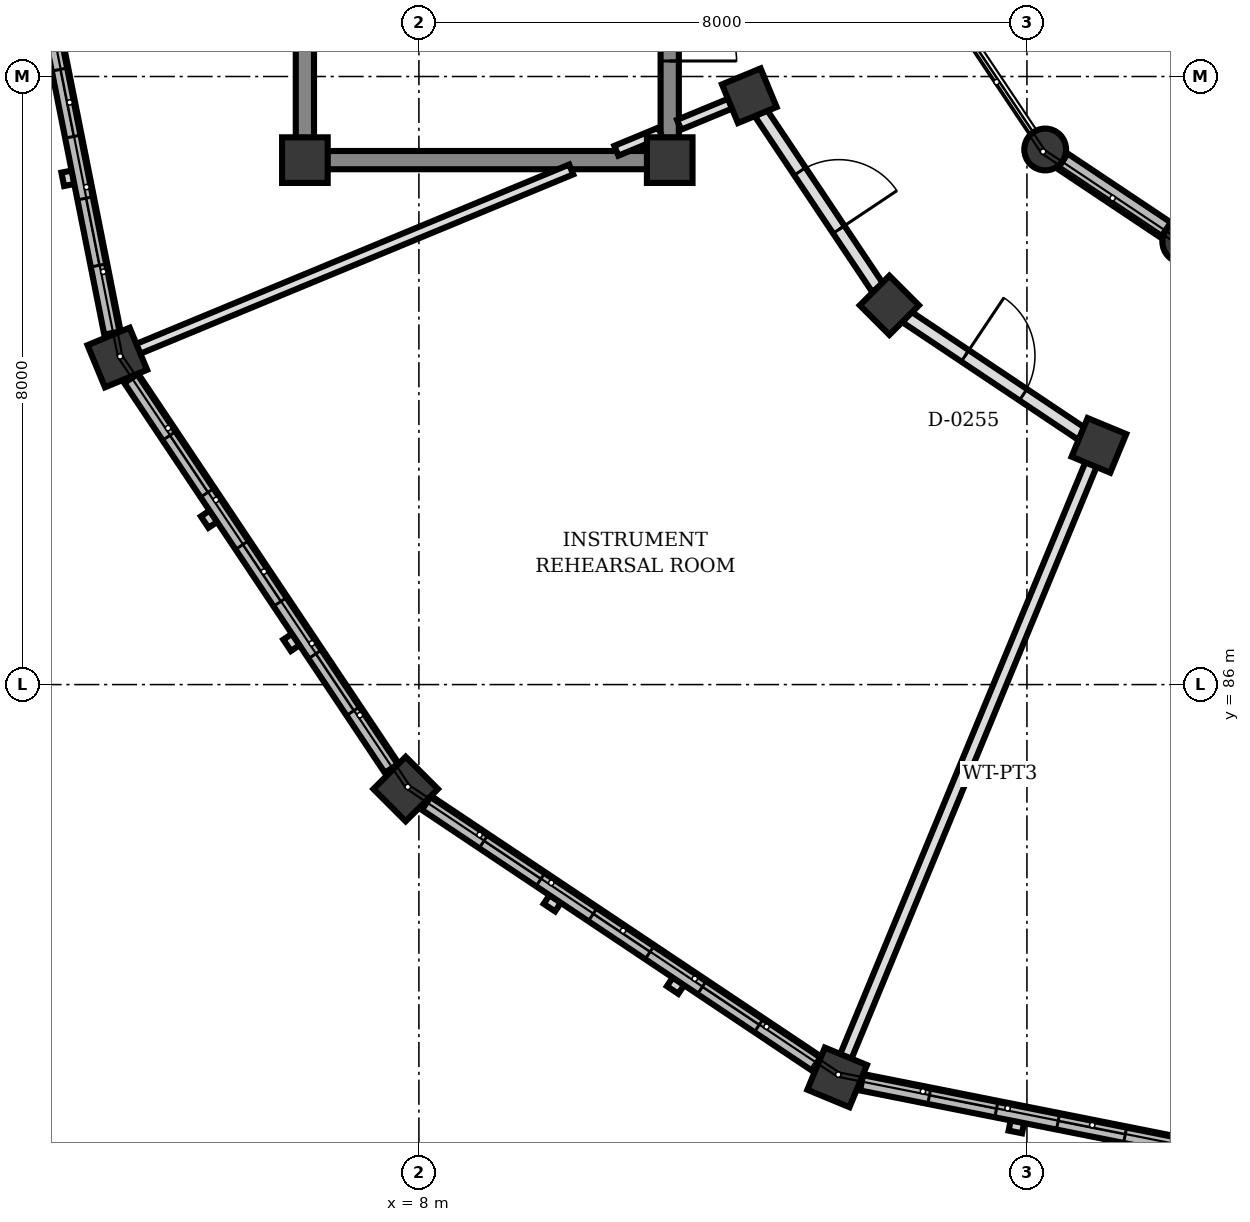
"""IFC4 building model, lengths in metres.
Left out: names, types, materials, properties, quantities, classifications, styles, units other than length and angle.
Written with IfcOpenShell. Run it as: python <this file> out.ifc"""

import sys

from ifc_helpers import new_model, si_unit, direction, frame, frame_2d, origin, origin_2d, place, context, subcontext, project, spatial, rectangle, circle, extrude, element, fill, save


model = new_model("IFC4")
c1 = context("Model", 3, precision=1e-05, world=origin(), true_north=direction((0.0, 1.0)))
c2 = subcontext(c1, "Body", "Model", "MODEL_VIEW")
j1 = project(units=[si_unit("LENGTHUNIT", "METRE"), si_unit("PLANEANGLEUNIT", "RADIAN")], contexts=[c1])
p1 = place(None, origin())
s1 = spatial("IfcSite", under=j1, at=p1, CompositionType="ELEMENT")
p2 = place(p1, origin())
s2 = spatial("IfcBuilding", under=s1, at=p2, CompositionType="ELEMENT")
p3 = place(p2, frame((0.0, 0.0, 4.5)))
s3 = spatial("IfcBuildingStorey", under=s2, at=p3, CompositionType="ELEMENT", Elevation=4.5)
for number, where, z_axis, x_axis in (
    (1, (6.5, 92.9, 0.0), (0.0, 0.0, 1.0), (1.0, 0.0, 0.0)),
    (2, (11.3, 92.9, 0.0), (0.0, 0.0, 1.0), (1.0, 0.0, 0.0)),
):
    element("IfcColumn", number, at=place(p3, frame(where, z_axis=z_axis, x_axis=x_axis)), inside=s3, PredefinedType="COLUMN", context=c2, shape_type="SweptSolid", body=[
        extrude(rectangle(XDim=0.6, YDim=0.6, at=origin_2d()), origin(), (0.0, 0.0, 1.0), 4.0),
    ])
for number, where, z_axis, x_axis in (
    (3, (16.24, 93.04, 0.0), (0.0, 0.0, 1.0), (1.0, 0.0, 0.0)),
    (4, (18.057, 91.826, 0.0), (0.0, 0.0, 1.0), (1.0, 0.0, 0.0)),
):
    element("IfcColumn", number, at=place(p3, frame(where, z_axis=z_axis, x_axis=x_axis)), inside=s3, PredefinedType="COLUMN", context=c2, shape_type="SweptSolid", body=[
        extrude(circle(Radius=0.275, at=origin_2d()), origin(), (0.0, 0.0, 1.0), 4.0),
    ])
for number, where, z_axis, x_axis in (
    (5, (12.347, 93.747, 0.0), (0.0, 0.0, 1.0), (-0.924, -0.383, 0.0)),
    (6, (14.19, 90.99, 0.0), (0.0, 0.0, 1.0), (-0.707, -0.707, 0.0)),
    (7, (16.947, 89.147, 0.0), (0.0, 0.0, 1.0), (-0.383, -0.924, 0.0)),
):
    element("IfcColumn", number, at=place(p3, frame(where, z_axis=z_axis, x_axis=x_axis)), inside=s3, PredefinedType="COLUMN", context=c2, shape_type="SweptSolid", body=[
        extrude(rectangle(XDim=0.55, YDim=0.55, at=origin_2d()), origin(), (0.0, 0.0, 1.0), 4.0),
    ])
for number, where, z_axis, x_axis in (
    (8, (4.032, 90.303, 0.0), (0.0, 0.0, 1.0), (-0.924, -0.383, 0.0)),
    (9, (7.826, 84.626, 0.0), (0.0, 0.0, 1.0), (-0.707, -0.707, 0.0)),
    (10, (13.503, 80.832, 0.0), (0.0, 0.0, 1.0), (-0.383, -0.924, 0.0)),
):
    element("IfcColumn", number, at=place(p3, frame(where, z_axis=z_axis, x_axis=x_axis)), inside=s3, PredefinedType="COLUMN", context=c2, shape_type="SweptSolid", body=[
        extrude(rectangle(XDim=0.6, YDim=0.6, at=origin_2d()), origin(), (0.0, 0.0, 1.0), 4.0),
    ])
p4 = place(p3, frame((3.968, 90.626, 0.0), z_axis=(0.0, 0.0, 1.0), x_axis=(-0.195164813773, 0.980770460131, 0.0)))
e11 = element("IfcWall", 11, at=p4, inside=s3, PredefinedType="SOLIDWALL", context=c2, shape_type="SweptSolid", body=[
    extrude(rectangle(XDim=6.17, YDim=0.22, at=frame_2d((3.085, 0.0))), origin(), (0.0, 0.0, 1.0), 3.172),
])
p5 = place(p4, frame((0.907, 0.0, 0.85)))
e12 = element("IfcOpeningElement", 12, at=p5, cuts=e11, PredefinedType="OPENING", context=c2, shape_type="SweptSolid", body=[
    extrude(rectangle(XDim=0.9, YDim=1.4, at=frame_2d((0.45, 0.7))), frame((0.0, 0.12, 0.0), z_axis=(0.0, -1.0, 0.0), x_axis=(1.0, 0.0, 0.0)), (0.0, 0.0, 1.0), 0.24),
])
p6 = place(p4, frame((2.635, 0.0, 0.85)))
e13 = element("IfcOpeningElement", 13, at=p6, cuts=e11, PredefinedType="OPENING", context=c2, shape_type="SweptSolid", body=[
    extrude(rectangle(XDim=0.9, YDim=1.4, at=frame_2d((0.45, 0.7))), frame((0.0, 0.12, 0.0), z_axis=(0.0, -1.0, 0.0), x_axis=(1.0, 0.0, 0.0)), (0.0, 0.0, 1.0), 0.24),
])
p7 = place(p4, frame((4.362, 0.0, 0.85)))
e14 = element("IfcOpeningElement", 14, at=p7, cuts=e11, PredefinedType="OPENING", context=c2, shape_type="SweptSolid", body=[
    extrude(rectangle(XDim=0.9, YDim=1.4, at=frame_2d((0.45, 0.7))), frame((0.0, 0.12, 0.0), z_axis=(0.0, -1.0, 0.0), x_axis=(1.0, 0.0, 0.0)), (0.0, 0.0, 1.0), 0.24),
])
p8 = place(p3, frame((7.643, 84.9, 0.0), z_axis=(0.0, 0.0, 1.0), x_axis=(-0.555658736667, 0.831410469242, 0.0)))
e15 = element("IfcWall", 15, at=p8, inside=s3, PredefinedType="SOLIDWALL", context=c2, shape_type="SweptSolid", body=[
    extrude(rectangle(XDim=6.169, YDim=0.22, at=frame_2d((3.084, 0.0))), origin(), (0.0, 0.0, 1.0), 3.172),
])
p9 = place(p8, frame((0.907, 0.0, 0.85)))
e16 = element("IfcOpeningElement", 16, at=p9, cuts=e15, PredefinedType="OPENING", context=c2, shape_type="SweptSolid", body=[
    extrude(rectangle(XDim=0.9, YDim=1.4, at=frame_2d((0.45, 0.7))), frame((0.0, 0.12, 0.0), z_axis=(0.0, -1.0, 0.0), x_axis=(1.0, 0.0, 0.0)), (0.0, 0.0, 1.0), 0.24),
])
p10 = place(p8, frame((2.635, 0.0, 0.85)))
e17 = element("IfcOpeningElement", 17, at=p10, cuts=e15, PredefinedType="OPENING", context=c2, shape_type="SweptSolid", body=[
    extrude(rectangle(XDim=0.9, YDim=1.4, at=frame_2d((0.45, 0.7))), frame((0.0, 0.12, 0.0), z_axis=(0.0, -1.0, 0.0), x_axis=(1.0, 0.0, 0.0)), (0.0, 0.0, 1.0), 0.24),
])
p11 = place(p8, frame((4.362, 0.0, 0.85)))
e18 = element("IfcOpeningElement", 18, at=p11, cuts=e15, PredefinedType="OPENING", context=c2, shape_type="SweptSolid", body=[
    extrude(rectangle(XDim=0.9, YDim=1.4, at=frame_2d((0.45, 0.7))), frame((0.0, 0.12, 0.0), z_axis=(0.0, -1.0, 0.0), x_axis=(1.0, 0.0, 0.0)), (0.0, 0.0, 1.0), 0.24),
])
p12 = place(p3, frame((13.229, 81.015, 0.0), z_axis=(0.0, 0.0, 1.0), x_axis=(-0.831379966495, 0.555704374025, 0.0)))
e19 = element("IfcWall", 19, at=p12, inside=s3, PredefinedType="SOLIDWALL", context=c2, shape_type="SweptSolid", body=[
    extrude(rectangle(XDim=6.169, YDim=0.22, at=frame_2d((3.084, 0.0))), origin(), (0.0, 0.0, 1.0), 3.172),
])
p13 = place(p12, frame((0.907, 0.0, 0.85)))
e20 = element("IfcOpeningElement", 20, at=p13, cuts=e19, PredefinedType="OPENING", context=c2, shape_type="SweptSolid", body=[
    extrude(rectangle(XDim=0.9, YDim=1.4, at=frame_2d((0.45, 0.7))), frame((0.0, 0.12, 0.0), z_axis=(0.0, -1.0, 0.0), x_axis=(1.0, 0.0, 0.0)), (0.0, 0.0, 1.0), 0.24),
])
p14 = place(p12, frame((2.635, 0.0, 0.85)))
e21 = element("IfcOpeningElement", 21, at=p14, cuts=e19, PredefinedType="OPENING", context=c2, shape_type="SweptSolid", body=[
    extrude(rectangle(XDim=0.9, YDim=1.4, at=frame_2d((0.45, 0.7))), frame((0.0, 0.12, 0.0), z_axis=(0.0, -1.0, 0.0), x_axis=(1.0, 0.0, 0.0)), (0.0, 0.0, 1.0), 0.24),
])
p15 = place(p12, frame((4.362, 0.0, 0.85)))
e22 = element("IfcOpeningElement", 22, at=p15, cuts=e19, PredefinedType="OPENING", context=c2, shape_type="SweptSolid", body=[
    extrude(rectangle(XDim=0.9, YDim=1.4, at=frame_2d((0.45, 0.7))), frame((0.0, 0.12, 0.0), z_axis=(0.0, -1.0, 0.0), x_axis=(1.0, 0.0, 0.0)), (0.0, 0.0, 1.0), 0.24),
])
p16 = place(p3, frame((16.47, 92.886, 0.0), z_axis=(0.0, 0.0, 1.0), x_axis=(0.83165874011, -0.555287078904, 0.0)))
e23 = element("IfcWall", 23, at=p16, inside=s3, PredefinedType="SOLIDWALL", context=c2, shape_type="SweptSolid", body=[
    extrude(rectangle(XDim=1.632, YDim=0.24, at=frame_2d((0.816, 0.0))), origin(), (0.0, 0.0, 1.0), 3.222),
])
p17 = place(p3, frame((19.877, 79.564, 0.0), z_axis=(0.0, 0.0, 1.0), x_axis=(-0.980770460131, 0.195164813773, 0.0)))
e24 = element("IfcWall", 24, at=p17, inside=s3, PredefinedType="SOLIDWALL", context=c2, shape_type="SweptSolid", body=[
    extrude(rectangle(XDim=6.17, YDim=0.22, at=frame_2d((3.085, 0.0))), origin(), (0.0, 0.0, 1.0), 3.172),
])
p18 = place(p17, frame((0.907, 0.0, 0.85)))
e25 = element("IfcOpeningElement", 25, at=p18, cuts=e24, PredefinedType="OPENING", context=c2, shape_type="SweptSolid", body=[
    extrude(rectangle(XDim=0.9, YDim=1.4, at=frame_2d((0.45, 0.7))), frame((0.0, 0.12, 0.0), z_axis=(0.0, -1.0, 0.0), x_axis=(1.0, 0.0, 0.0)), (0.0, 0.0, 1.0), 0.24),
])
p19 = place(p17, frame((2.635, 0.0, 0.85)))
e26 = element("IfcOpeningElement", 26, at=p19, cuts=e24, PredefinedType="OPENING", context=c2, shape_type="SweptSolid", body=[
    extrude(rectangle(XDim=0.9, YDim=1.4, at=frame_2d((0.45, 0.7))), frame((0.0, 0.12, 0.0), z_axis=(0.0, -1.0, 0.0), x_axis=(1.0, 0.0, 0.0)), (0.0, 0.0, 1.0), 0.24),
])
p20 = place(p17, frame((4.362, 0.0, 0.85)))
e27 = element("IfcOpeningElement", 27, at=p20, cuts=e24, PredefinedType="OPENING", context=c2, shape_type="SweptSolid", body=[
    extrude(rectangle(XDim=0.9, YDim=1.4, at=frame_2d((0.45, 0.7))), frame((0.0, 0.12, 0.0), z_axis=(0.0, -1.0, 0.0), x_axis=(1.0, 0.0, 0.0)), (0.0, 0.0, 1.0), 0.24),
])
p21 = place(p3, frame((6.5, 93.192, 0.0), z_axis=(0.0, 0.0, 1.0), x_axis=(0.0, 1.0, 0.0)))
e28 = element("IfcWall", 28, at=p21, inside=s3, PredefinedType="SHEAR", context=c2, shape_type="SweptSolid", body=[
    extrude(rectangle(XDim=8.136, YDim=0.24, at=frame_2d((4.068, 0.0))), origin(), (0.0, 0.0, 1.0), 3.74),
])
p22 = place(p3, frame((11.3, 101.328, 0.0), z_axis=(0.0, 0.0, 1.0), x_axis=(0.0, -1.0, 0.0)))
e29 = element("IfcWall", 29, at=p22, inside=s3, PredefinedType="SHEAR", context=c2, shape_type="SweptSolid", body=[
    extrude(rectangle(XDim=8.136, YDim=0.24, at=frame_2d((4.068, 0.0))), origin(), (0.0, 0.0, 1.0), 3.74),
])
p23 = place(p22, frame((6.244, 0.0, 0.0)))
e30 = element("IfcOpeningElement", 30, at=p23, cuts=e29, PredefinedType="OPENING", context=c2, shape_type="SweptSolid", body=[
    extrude(rectangle(XDim=0.88, YDim=2.1, at=frame_2d((0.44, 1.05))), frame((0.0, 0.13, 0.0), z_axis=(0.0, -1.0, 0.0), x_axis=(1.0, 0.0, 0.0)), (0.0, 0.0, 1.0), 0.26),
])
p24 = place(p3, frame((11.008, 92.9, 0.0), z_axis=(0.0, 0.0, 1.0), x_axis=(-1.0, 0.0, 0.0)))
e31 = element("IfcWall", 31, at=p24, inside=s3, PredefinedType="SHEAR", context=c2, shape_type="SweptSolid", body=[
    extrude(rectangle(XDim=4.216, YDim=0.24, at=frame_2d((2.108, 0.0))), origin(), (0.0, 0.0, 1.0), 3.74),
])
p25 = place(p3, frame((12.1, 93.645, 0.0), z_axis=(0.0, 0.0, 1.0), x_axis=(-0.924069600435, -0.382224245113, 0.0)))
e32 = element("IfcWall", 32, at=p25, inside=s3, PredefinedType="PARTITIONING", context=c2, shape_type="SweptSolid", body=[
    extrude(rectangle(XDim=0.733, YDim=0.14, at=frame_2d((0.366, 0.0))), origin(), (0.0, 0.0, 1.0), 3.072),
])
p26 = place(p3, frame((11.177, 93.263, 0.0), z_axis=(0.0, 0.0, 1.0), x_axis=(-0.923812676193, -0.382844797933, 0.0)))
e33 = element("IfcWall", 33, at=p26, inside=s3, PredefinedType="PARTITIONING", context=c2, shape_type="SweptSolid", body=[
    extrude(rectangle(XDim=0.627, YDim=0.14, at=frame_2d((0.313, 0.0))), origin(), (0.0, 0.0, 1.0), 3.072),
])
p27 = place(p3, frame((10.004, 92.777, 0.0), z_axis=(0.0, 0.0, 1.0), x_axis=(-0.923864955254, -0.382718623082, 0.0)))
e34 = element("IfcWall", 34, at=p27, inside=s3, PredefinedType="PARTITIONING", context=c2, shape_type="SweptSolid", body=[
    extrude(rectangle(XDim=6.172, YDim=0.14, at=frame_2d((3.086, 0.0))), origin(), (0.0, 0.0, 1.0), 3.072),
])
p28 = place(p3, frame((16.845, 88.9, 0.0), z_axis=(0.0, 0.0, 1.0), x_axis=(-0.382683896966, -0.923879340067, 0.0)))
e35 = element("IfcWall", 35, at=p28, inside=s3, PredefinedType="PARTITIONING", context=c2, shape_type="SweptSolid", body=[
    extrude(rectangle(XDim=8.44, YDim=0.16, at=frame_2d((4.22, 0.0))), origin(), (0.0, 0.0, 1.0), 3.072),
])
p29 = place(p3, frame((12.498, 93.521, 0.0), z_axis=(0.0, 0.0, 1.0), x_axis=(0.555797002478, -0.831318045056, 0.0)))
e36 = element("IfcWall", 36, at=p29, inside=s3, PredefinedType="PARTITIONING", context=c2, shape_type="SweptSolid", body=[
    extrude(rectangle(XDim=2.773, YDim=0.18, at=frame_2d((1.386, 0.0))), origin(), (0.0, 0.0, 1.0), 3.072),
])
p30 = place(p29, frame((0.926, 0.0, 0.0)))
e37 = element("IfcOpeningElement", 37, at=p30, cuts=e36, PredefinedType="OPENING", context=c2, shape_type="SweptSolid", body=[
    extrude(rectangle(XDim=0.92, YDim=2.1, at=frame_2d((0.46, 1.05))), frame((0.0, 0.1, 0.0), z_axis=(0.0, -1.0, 0.0), x_axis=(1.0, 0.0, 0.0)), (0.0, 0.0, 1.0), 0.2),
])
p31 = place(p3, frame((14.416, 90.839, 0.0), z_axis=(0.0, 0.0, 1.0), x_axis=(0.831318045056, -0.555797002478, 0.0)))
e38 = element("IfcWall", 38, at=p31, inside=s3, PredefinedType="PARTITIONING", context=c2, shape_type="SweptSolid", body=[
    extrude(rectangle(XDim=2.773, YDim=0.18, at=frame_2d((1.386, 0.0))), origin(), (0.0, 0.0, 1.0), 3.072),
])
p32 = place(p31, frame((0.926, 0.0, 0.0)))
e39 = element("IfcOpeningElement", 39, at=p32, cuts=e38, PredefinedType="OPENING", context=c2, shape_type="SweptSolid", body=[
    extrude(rectangle(XDim=0.92, YDim=2.1, at=frame_2d((0.46, 1.05))), frame((0.0, 0.1, 0.0), z_axis=(0.0, -1.0, 0.0), x_axis=(1.0, 0.0, 0.0)), (0.0, 0.0, 1.0), 0.2),
])
p33 = place(p5, origin())
e40 = element("IfcWindow", 40, at=p33, inside=s3, PartitioningType="SINGLE_PANEL", PredefinedType="WINDOW", context=c2, shape_type="SweptSolid", body=[
    extrude(rectangle(XDim=0.9, YDim=1.4, at=frame_2d((0.45, 0.7))), frame((0.0, 0.03, 0.0), z_axis=(0.0, -1.0, 0.0), x_axis=(1.0, 0.0, 0.0)), (0.0, 0.0, 1.0), 0.06),
])
fill(e12, e40)
p34 = place(p6, origin())
e41 = element("IfcWindow", 41, at=p34, inside=s3, PartitioningType="SINGLE_PANEL", PredefinedType="WINDOW", context=c2, shape_type="SweptSolid", body=[
    extrude(rectangle(XDim=0.9, YDim=1.4, at=frame_2d((0.45, 0.7))), frame((0.0, 0.03, 0.0), z_axis=(0.0, -1.0, 0.0), x_axis=(1.0, 0.0, 0.0)), (0.0, 0.0, 1.0), 0.06),
])
fill(e13, e41)
p35 = place(p9, origin())
e42 = element("IfcWindow", 42, at=p35, inside=s3, PartitioningType="SINGLE_PANEL", PredefinedType="WINDOW", context=c2, shape_type="SweptSolid", body=[
    extrude(rectangle(XDim=0.9, YDim=1.4, at=frame_2d((0.45, 0.7))), frame((0.0, 0.03, 0.0), z_axis=(0.0, -1.0, 0.0), x_axis=(1.0, 0.0, 0.0)), (0.0, 0.0, 1.0), 0.06),
])
fill(e16, e42)
p36 = place(p10, origin())
e43 = element("IfcWindow", 43, at=p36, inside=s3, PartitioningType="SINGLE_PANEL", PredefinedType="WINDOW", context=c2, shape_type="SweptSolid", body=[
    extrude(rectangle(XDim=0.9, YDim=1.4, at=frame_2d((0.45, 0.7))), frame((0.0, 0.03, 0.0), z_axis=(0.0, -1.0, 0.0), x_axis=(1.0, 0.0, 0.0)), (0.0, 0.0, 1.0), 0.06),
])
fill(e17, e43)
p37 = place(p11, origin())
e44 = element("IfcWindow", 44, at=p37, inside=s3, PartitioningType="SINGLE_PANEL", PredefinedType="WINDOW", context=c2, shape_type="SweptSolid", body=[
    extrude(rectangle(XDim=0.9, YDim=1.4, at=frame_2d((0.45, 0.7))), frame((0.0, 0.03, 0.0), z_axis=(0.0, -1.0, 0.0), x_axis=(1.0, 0.0, 0.0)), (0.0, 0.0, 1.0), 0.06),
])
fill(e18, e44)
p38 = place(p13, origin())
e45 = element("IfcWindow", 45, at=p38, inside=s3, PartitioningType="SINGLE_PANEL", PredefinedType="WINDOW", context=c2, shape_type="SweptSolid", body=[
    extrude(rectangle(XDim=0.9, YDim=1.4, at=frame_2d((0.45, 0.7))), frame((0.0, 0.03, 0.0), z_axis=(0.0, -1.0, 0.0), x_axis=(1.0, 0.0, 0.0)), (0.0, 0.0, 1.0), 0.06),
])
fill(e20, e45)
p39 = place(p14, origin())
e46 = element("IfcWindow", 46, at=p39, inside=s3, PartitioningType="SINGLE_PANEL", PredefinedType="WINDOW", context=c2, shape_type="SweptSolid", body=[
    extrude(rectangle(XDim=0.9, YDim=1.4, at=frame_2d((0.45, 0.7))), frame((0.0, 0.03, 0.0), z_axis=(0.0, -1.0, 0.0), x_axis=(1.0, 0.0, 0.0)), (0.0, 0.0, 1.0), 0.06),
])
fill(e21, e46)
p40 = place(p15, origin())
e47 = element("IfcWindow", 47, at=p40, inside=s3, PartitioningType="SINGLE_PANEL", PredefinedType="WINDOW", context=c2, shape_type="SweptSolid", body=[
    extrude(rectangle(XDim=0.9, YDim=1.4, at=frame_2d((0.45, 0.7))), frame((0.0, 0.03, 0.0), z_axis=(0.0, -1.0, 0.0), x_axis=(1.0, 0.0, 0.0)), (0.0, 0.0, 1.0), 0.06),
])
fill(e22, e47)
p41 = place(p19, origin())
e48 = element("IfcWindow", 48, at=p41, inside=s3, PartitioningType="SINGLE_PANEL", PredefinedType="WINDOW", context=c2, shape_type="SweptSolid", body=[
    extrude(rectangle(XDim=0.9, YDim=1.4, at=frame_2d((0.45, 0.7))), frame((0.0, 0.03, 0.0), z_axis=(0.0, -1.0, 0.0), x_axis=(1.0, 0.0, 0.0)), (0.0, 0.0, 1.0), 0.06),
])
fill(e26, e48)
p42 = place(p20, origin())
e49 = element("IfcWindow", 49, at=p42, inside=s3, PartitioningType="SINGLE_PANEL", PredefinedType="WINDOW", context=c2, shape_type="SweptSolid", body=[
    extrude(rectangle(XDim=0.9, YDim=1.4, at=frame_2d((0.45, 0.7))), frame((0.0, 0.03, 0.0), z_axis=(0.0, -1.0, 0.0), x_axis=(1.0, 0.0, 0.0)), (0.0, 0.0, 1.0), 0.06),
])
fill(e27, e49)
p43 = place(p23, origin())
e50 = element("IfcDoor", 50, at=p43, inside=s3, OperationType="SINGLE_SWING_RIGHT", PredefinedType="DOOR", context=c2, shape_type="SweptSolid", body=[
    extrude(rectangle(XDim=0.88, YDim=2.1, at=frame_2d((0.44, 1.05))), frame((0.0, 0.025, 0.0), z_axis=(0.0, -1.0, 0.0), x_axis=(1.0, 0.0, 0.0)), (0.0, 0.0, 1.0), 0.05),
])
fill(e30, e50)
p44 = place(p30, origin())
e51 = element("IfcDoor", 51, at=p44, inside=s3, OperationType="SINGLE_SWING_RIGHT", PredefinedType="DOOR", context=c2, shape_type="SweptSolid", body=[
    extrude(rectangle(XDim=0.92, YDim=2.1, at=frame_2d((0.46, 1.05))), frame((0.0, 0.025, 0.0), z_axis=(0.0, -1.0, 0.0), x_axis=(1.0, 0.0, 0.0)), (0.0, 0.0, 1.0), 0.05),
])
fill(e37, e51)
p45 = place(p32, origin())
e52 = element("IfcDoor", 52, at=p45, inside=s3, OperationType="SINGLE_SWING_LEFT", PredefinedType="DOOR", context=c2, shape_type="SweptSolid", body=[
    extrude(rectangle(XDim=0.92, YDim=2.1, at=frame_2d((0.46, 1.05))), frame((0.0, 0.025, 0.0), z_axis=(0.0, -1.0, 0.0), x_axis=(1.0, 0.0, 0.0)), (0.0, 0.0, 1.0), 0.05),
])
fill(e39, e52)
save(model, sys.argv[1])
